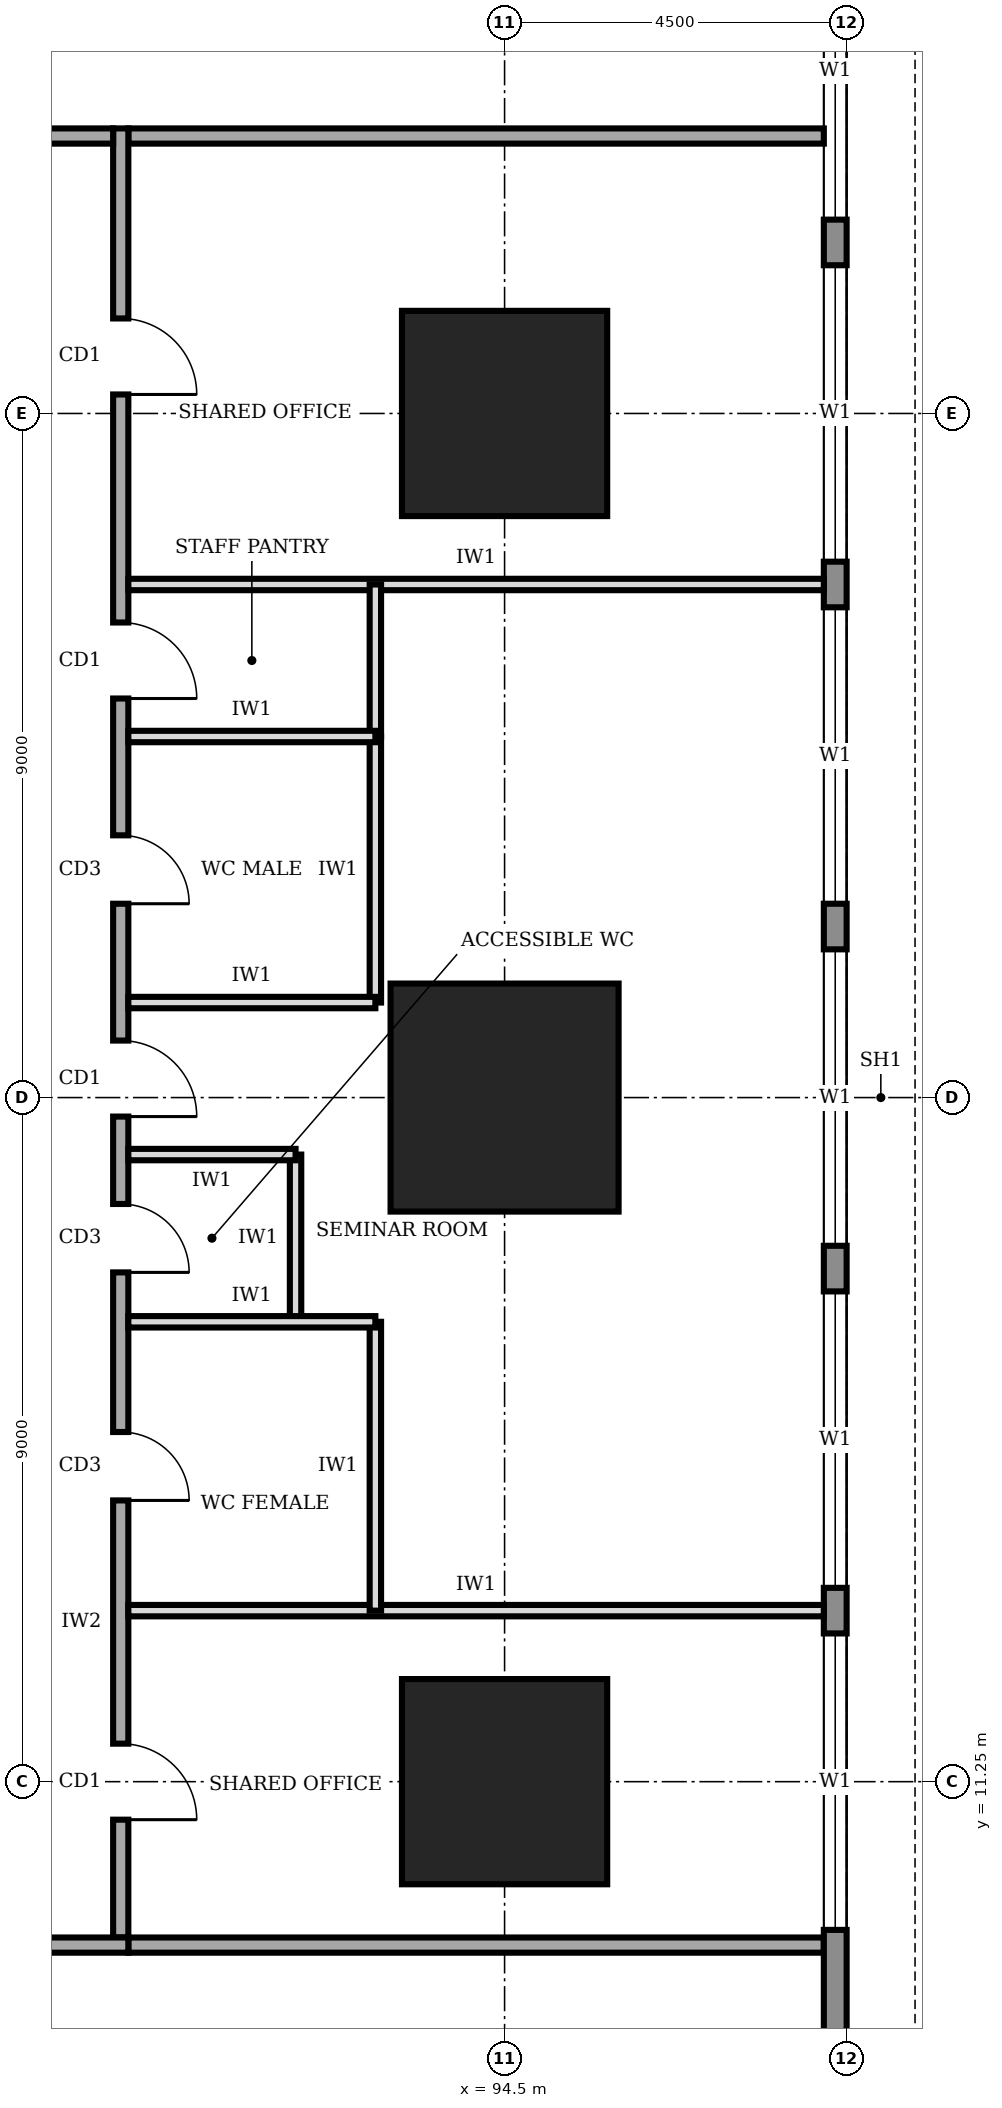
"""IFC4 building model, lengths in metres.
Left out: names, types, materials, properties, quantities, classifications, styles, units other than length and angle.
Written with IfcOpenShell. Run it as: python <this file> out.ifc"""

import sys

from ifc_helpers import new_model, si_unit, direction, frame, frame_2d, origin, origin_2d, place, context, subcontext, project, spatial, rectangle, extrude, element, fill, save


model = new_model("IFC4")
c1 = context("Model", 3, precision=1e-05, world=origin(), true_north=direction((0.0, 1.0)))
c2 = subcontext(c1, "Body", "Model", "MODEL_VIEW")
j1 = project(units=[si_unit("LENGTHUNIT", "METRE"), si_unit("PLANEANGLEUNIT", "RADIAN")], contexts=[c1])
p1 = place(None, origin())
s1 = spatial("IfcSite", under=j1, at=p1, CompositionType="ELEMENT")
p2 = place(p1, origin())
s2 = spatial("IfcBuilding", under=s1, at=p2, CompositionType="ELEMENT")
p3 = place(p2, frame((0.0, 0.0, 29.0)))
s3 = spatial("IfcBuildingStorey", under=s2, at=p3, CompositionType="ELEMENT", Elevation=29.0)
p4 = place(p3, frame((94.5, 11.25, 0.0), z_axis=(0.0, 0.0, 1.0), x_axis=(1.0, 0.0, 0.0)))
e1 = element("IfcColumn", 1, at=p4, inside=s3, PredefinedType="COLUMN", context=c2, shape_type="SweptSolid", body=[
    extrude(rectangle(XDim=2.7, YDim=2.7, at=origin_2d()), origin(), (0.0, 0.0, 1.0), 4.0),
])
p5 = place(p3, frame((94.5, 20.25, 0.0), z_axis=(0.0, 0.0, 1.0), x_axis=(1.0, 0.0, 0.0)))
e2 = element("IfcColumn", 2, at=p5, inside=s3, PredefinedType="COLUMN", context=c2, shape_type="SweptSolid", body=[
    extrude(rectangle(XDim=3.0, YDim=3.0, at=origin_2d()), origin(), (0.0, 0.0, 1.0), 4.0),
])
p6 = place(p3, frame((94.5, 29.25, 0.0), z_axis=(0.0, 0.0, 1.0), x_axis=(1.0, 0.0, 0.0)))
e3 = element("IfcColumn", 3, at=p6, inside=s3, PredefinedType="COLUMN", context=c2, shape_type="SweptSolid", body=[
    extrude(rectangle(XDim=2.7, YDim=2.7, at=origin_2d()), origin(), (0.0, 0.0, 1.0), 4.0),
])
p7 = place(p3, frame((98.85, 4.52, 0.0), z_axis=(0.0, 0.0, 1.0), x_axis=(0.0, 1.0, 0.0)))
e4 = element("IfcWall", 4, at=p7, inside=s3, PredefinedType="STANDARD", context=c2, shape_type="SweptSolid", body=[
    extrude(rectangle(XDim=31.46, YDim=0.3, at=frame_2d((15.73, 0.0))), origin(), (0.0, 0.0, 1.0), 3.75),
])
p8 = place(p7, frame((4.78, 0.0, 0.9)))
e5 = element("IfcOpeningElement", 5, at=p8, cuts=e4, PredefinedType="OPENING", context=c2, shape_type="SweptSolid", body=[
    extrude(rectangle(XDim=3.9, YDim=2.2, at=frame_2d((1.95, 1.1))), frame((0.0, 0.16, 0.0), z_axis=(0.0, -1.0, 0.0), x_axis=(1.0, 0.0, 0.0)), (0.0, 0.0, 1.0), 0.32),
])
p9 = place(p7, frame((9.28, 0.0, 0.9)))
e6 = element("IfcOpeningElement", 6, at=p9, cuts=e4, PredefinedType="OPENING", context=c2, shape_type="SweptSolid", body=[
    extrude(rectangle(XDim=3.9, YDim=2.2, at=frame_2d((1.95, 1.1))), frame((0.0, 0.16, 0.0), z_axis=(0.0, -1.0, 0.0), x_axis=(1.0, 0.0, 0.0)), (0.0, 0.0, 1.0), 0.32),
])
p10 = place(p7, frame((13.78, 0.0, 0.9)))
e7 = element("IfcOpeningElement", 7, at=p10, cuts=e4, PredefinedType="OPENING", context=c2, shape_type="SweptSolid", body=[
    extrude(rectangle(XDim=3.9, YDim=2.2, at=frame_2d((1.95, 1.1))), frame((0.0, 0.16, 0.0), z_axis=(0.0, -1.0, 0.0), x_axis=(1.0, 0.0, 0.0)), (0.0, 0.0, 1.0), 0.32),
])
p11 = place(p7, frame((18.28, 0.0, 0.9)))
e8 = element("IfcOpeningElement", 8, at=p11, cuts=e4, PredefinedType="OPENING", context=c2, shape_type="SweptSolid", body=[
    extrude(rectangle(XDim=3.9, YDim=2.2, at=frame_2d((1.95, 1.1))), frame((0.0, 0.16, 0.0), z_axis=(0.0, -1.0, 0.0), x_axis=(1.0, 0.0, 0.0)), (0.0, 0.0, 1.0), 0.32),
])
p12 = place(p7, frame((22.78, 0.0, 0.9)))
e9 = element("IfcOpeningElement", 9, at=p12, cuts=e4, PredefinedType="OPENING", context=c2, shape_type="SweptSolid", body=[
    extrude(rectangle(XDim=3.9, YDim=2.2, at=frame_2d((1.95, 1.1))), frame((0.0, 0.16, 0.0), z_axis=(0.0, -1.0, 0.0), x_axis=(1.0, 0.0, 0.0)), (0.0, 0.0, 1.0), 0.32),
])
p13 = place(p7, frame((27.28, 0.0, 0.9)))
e10 = element("IfcOpeningElement", 10, at=p13, cuts=e4, PredefinedType="OPENING", context=c2, shape_type="SweptSolid", body=[
    extrude(rectangle(XDim=3.9, YDim=2.2, at=frame_2d((1.95, 1.1))), frame((0.0, 0.16, 0.0), z_axis=(0.0, -1.0, 0.0), x_axis=(1.0, 0.0, 0.0)), (0.0, 0.0, 1.0), 0.32),
])
p14 = place(p3, frame((72.65, 9.1, 0.0), z_axis=(0.0, 0.0, 1.0), x_axis=(1.0, 0.0, 0.0)))
e11 = element("IfcWall", 11, at=p14, inside=s3, PredefinedType="SOLIDWALL", context=c2, shape_type="SweptSolid", body=[
    extrude(rectangle(XDim=16.9, YDim=0.2, at=frame_2d((8.45, 0.0))), origin(), (0.0, 0.0, 1.0), 3.75),
])
p15 = place(p14, frame((0.925, 0.0, 0.0)))
e12 = element("IfcOpeningElement", 12, at=p15, cuts=e11, PredefinedType="OPENING", context=c2, shape_type="SweptSolid", body=[
    extrude(rectangle(XDim=1.8, YDim=2.1, at=frame_2d((0.9, 1.05))), frame((0.0, 0.11, 0.0), z_axis=(0.0, -1.0, 0.0), x_axis=(1.0, 0.0, 0.0)), (0.0, 0.0, 1.0), 0.22),
])
p16 = place(p14, frame((7.85, 0.0, 0.0)))
e13 = element("IfcOpeningElement", 13, at=p16, cuts=e11, PredefinedType="OPENING", context=c2, shape_type="SweptSolid", body=[
    extrude(rectangle(XDim=1.0, YDim=2.1, at=frame_2d((0.5, 1.05))), frame((0.0, 0.11, 0.0), z_axis=(0.0, -1.0, 0.0), x_axis=(1.0, 0.0, 0.0)), (0.0, 0.0, 1.0), 0.22),
])
p17 = place(p14, frame((13.975, 0.0, 0.0)))
e14 = element("IfcOpeningElement", 14, at=p17, cuts=e11, PredefinedType="OPENING", context=c2, shape_type="SweptSolid", body=[
    extrude(rectangle(XDim=1.8, YDim=2.1, at=frame_2d((0.9, 1.05))), frame((0.0, 0.11, 0.0), z_axis=(0.0, -1.0, 0.0), x_axis=(1.0, 0.0, 0.0)), (0.0, 0.0, 1.0), 0.22),
])
p18 = place(p3, frame((89.45, 9.2, 0.0), z_axis=(0.0, 0.0, 1.0), x_axis=(0.0, 1.0, 0.0)))
e15 = element("IfcWall", 15, at=p18, inside=s3, PredefinedType="SOLIDWALL", context=c2, shape_type="SweptSolid", body=[
    extrude(rectangle(XDim=23.8, YDim=0.2, at=frame_2d((11.9, 0.0))), origin(), (0.0, 0.0, 1.0), 3.75),
])
p19 = place(p18, frame((1.55, 0.0, 0.0)))
e16 = element("IfcOpeningElement", 16, at=p19, cuts=e15, PredefinedType="OPENING", context=c2, shape_type="SweptSolid", body=[
    extrude(rectangle(XDim=1.0, YDim=2.1, at=frame_2d((0.5, 1.05))), frame((0.0, 0.11, 0.0), z_axis=(0.0, -1.0, 0.0), x_axis=(1.0, 0.0, 0.0)), (0.0, 0.0, 1.0), 0.22),
])
p20 = place(p18, frame((5.75, 0.0, 0.0)))
e17 = element("IfcOpeningElement", 17, at=p20, cuts=e15, PredefinedType="OPENING", context=c2, shape_type="SweptSolid", body=[
    extrude(rectangle(XDim=0.9, YDim=2.1, at=frame_2d((0.45, 1.05))), frame((0.0, 0.11, 0.0), z_axis=(0.0, -1.0, 0.0), x_axis=(1.0, 0.0, 0.0)), (0.0, 0.0, 1.0), 0.22),
])
p21 = place(p18, frame((8.75, 0.0, 0.0)))
e18 = element("IfcOpeningElement", 18, at=p21, cuts=e15, PredefinedType="OPENING", context=c2, shape_type="SweptSolid", body=[
    extrude(rectangle(XDim=0.9, YDim=2.1, at=frame_2d((0.45, 1.05))), frame((0.0, 0.11, 0.0), z_axis=(0.0, -1.0, 0.0), x_axis=(1.0, 0.0, 0.0)), (0.0, 0.0, 1.0), 0.22),
])
p22 = place(p18, frame((13.6, 0.0, 0.0)))
e19 = element("IfcOpeningElement", 19, at=p22, cuts=e15, PredefinedType="OPENING", context=c2, shape_type="SweptSolid", body=[
    extrude(rectangle(XDim=0.9, YDim=2.1, at=frame_2d((0.45, 1.05))), frame((0.0, 0.11, 0.0), z_axis=(0.0, -1.0, 0.0), x_axis=(1.0, 0.0, 0.0)), (0.0, 0.0, 1.0), 0.22),
])
p23 = place(p18, frame((16.3, 0.0, 0.0)))
e20 = element("IfcOpeningElement", 20, at=p23, cuts=e15, PredefinedType="OPENING", context=c2, shape_type="SweptSolid", body=[
    extrude(rectangle(XDim=1.0, YDim=2.1, at=frame_2d((0.5, 1.05))), frame((0.0, 0.11, 0.0), z_axis=(0.0, -1.0, 0.0), x_axis=(1.0, 0.0, 0.0)), (0.0, 0.0, 1.0), 0.22),
])
p24 = place(p18, frame((10.8, 0.0, 0.0)))
e21 = element("IfcOpeningElement", 21, at=p24, cuts=e15, PredefinedType="OPENING", context=c2, shape_type="SweptSolid", body=[
    extrude(rectangle(XDim=1.0, YDim=2.1, at=frame_2d((0.5, 1.05))), frame((0.0, 0.11, 0.0), z_axis=(0.0, -1.0, 0.0), x_axis=(1.0, 0.0, 0.0)), (0.0, 0.0, 1.0), 0.22),
])
p25 = place(p18, frame((20.3, 0.0, 0.0)))
e22 = element("IfcOpeningElement", 22, at=p25, cuts=e15, PredefinedType="OPENING", context=c2, shape_type="SweptSolid", body=[
    extrude(rectangle(XDim=1.0, YDim=2.1, at=frame_2d((0.5, 1.05))), frame((0.0, 0.11, 0.0), z_axis=(0.0, -1.0, 0.0), x_axis=(1.0, 0.0, 0.0)), (0.0, 0.0, 1.0), 0.22),
])
p26 = place(p3, frame((89.35, 32.9, 0.0), z_axis=(0.0, 0.0, 1.0), x_axis=(-1.0, 0.0, 0.0)))
e23 = element("IfcWall", 23, at=p26, inside=s3, PredefinedType="SOLIDWALL", context=c2, shape_type="SweptSolid", body=[
    extrude(rectangle(XDim=16.9, YDim=0.2, at=frame_2d((8.45, 0.0))), origin(), (0.0, 0.0, 1.0), 3.75),
])
p27 = place(p26, frame((14.375, 0.0, 0.0)))
e24 = element("IfcOpeningElement", 24, at=p27, cuts=e23, PredefinedType="OPENING", context=c2, shape_type="SweptSolid", body=[
    extrude(rectangle(XDim=1.0, YDim=2.1, at=frame_2d((0.5, 1.05))), frame((0.0, 0.11, 0.0), z_axis=(0.0, -1.0, 0.0), x_axis=(1.0, 0.0, 0.0)), (0.0, 0.0, 1.0), 0.22),
])
p28 = place(p26, frame((7.85, 0.0, 0.0)))
e25 = element("IfcOpeningElement", 25, at=p28, cuts=e23, PredefinedType="OPENING", context=c2, shape_type="SweptSolid", body=[
    extrude(rectangle(XDim=1.0, YDim=2.1, at=frame_2d((0.5, 1.05))), frame((0.0, 0.11, 0.0), z_axis=(0.0, -1.0, 0.0), x_axis=(1.0, 0.0, 0.0)), (0.0, 0.0, 1.0), 0.22),
])
p29 = place(p26, frame((1.325, 0.0, 0.0)))
e26 = element("IfcOpeningElement", 26, at=p29, cuts=e23, PredefinedType="OPENING", context=c2, shape_type="SweptSolid", body=[
    extrude(rectangle(XDim=1.0, YDim=2.1, at=frame_2d((0.5, 1.05))), frame((0.0, 0.11, 0.0), z_axis=(0.0, -1.0, 0.0), x_axis=(1.0, 0.0, 0.0)), (0.0, 0.0, 1.0), 0.22),
])
for number, where, z_axis, x_axis in (
    (27, (89.55, 9.1, 0.0), (0.0, 0.0, 1.0), (1.0, 0.0, 0.0)),
    (28, (89.55, 32.9, 0.0), (0.0, 0.0, 1.0), (1.0, 0.0, 0.0)),
):
    element("IfcWall", number, at=place(p3, frame(where, z_axis=z_axis, x_axis=x_axis)), inside=s3, PredefinedType="SOLIDWALL", context=c2, shape_type="SweptSolid", body=[
        extrude(rectangle(XDim=9.15, YDim=0.2, at=frame_2d((4.575, 0.0))), origin(), (0.0, 0.0, 1.0), 3.75),
    ])
for number, where, z_axis, x_axis in (
    (29, (89.55, 13.5, 0.0), (0.0, 0.0, 1.0), (1.0, 0.0, 0.0)),
    (30, (89.55, 27.0, 0.0), (0.0, 0.0, 1.0), (1.0, 0.0, 0.0)),
):
    element("IfcWall", number, at=place(p3, frame(where, z_axis=z_axis, x_axis=x_axis)), inside=s3, PredefinedType="PARTITIONING", context=c2, shape_type="SweptSolid", body=[
        extrude(rectangle(XDim=9.15, YDim=0.15, at=frame_2d((4.575, 0.0))), origin(), (0.0, 0.0, 1.0), 3.75),
    ])
p30 = place(p3, frame((89.55, 17.3, 0.0), z_axis=(0.0, 0.0, 1.0), x_axis=(1.0, 0.0, 0.0)))
e31 = element("IfcWall", 31, at=p30, inside=s3, PredefinedType="PARTITIONING", context=c2, shape_type="SweptSolid", body=[
    extrude(rectangle(XDim=3.25, YDim=0.15, at=frame_2d((1.625, 0.0))), origin(), (0.0, 0.0, 1.0), 3.75),
])
p31 = place(p3, frame((89.55, 19.5, 0.0), z_axis=(0.0, 0.0, 1.0), x_axis=(1.0, 0.0, 0.0)))
e32 = element("IfcWall", 32, at=p31, inside=s3, PredefinedType="PARTITIONING", context=c2, shape_type="SweptSolid", body=[
    extrude(rectangle(XDim=2.2, YDim=0.15, at=frame_2d((1.1, 0.0))), origin(), (0.0, 0.0, 1.0), 2.85),
])
for number, where, z_axis, x_axis in (
    (33, (89.55, 21.5, 0.0), (0.0, 0.0, 1.0), (1.0, 0.0, 0.0)),
    (34, (89.55, 25.0, 0.0), (0.0, 0.0, 1.0), (1.0, 0.0, 0.0)),
):
    element("IfcWall", number, at=place(p3, frame(where, z_axis=z_axis, x_axis=x_axis)), inside=s3, PredefinedType="PARTITIONING", context=c2, shape_type="SweptSolid", body=[
        extrude(rectangle(XDim=3.25, YDim=0.15, at=frame_2d((1.625, 0.0))), origin(), (0.0, 0.0, 1.0), 3.75),
    ])
p32 = place(p3, frame((92.8, 13.5, 0.0), z_axis=(0.0, 0.0, 1.0), x_axis=(0.0, 1.0, 0.0)))
e35 = element("IfcWall", 35, at=p32, inside=s3, PredefinedType="PARTITIONING", context=c2, shape_type="SweptSolid", body=[
    extrude(rectangle(XDim=3.8, YDim=0.15, at=frame_2d((1.9, 0.0))), origin(), (0.0, 0.0, 1.0), 3.75),
])
p33 = place(p3, frame((91.75, 17.3, 0.0), z_axis=(0.0, 0.0, 1.0), x_axis=(0.0, 1.0, 0.0)))
e36 = element("IfcWall", 36, at=p33, inside=s3, PredefinedType="PARTITIONING", context=c2, shape_type="SweptSolid", body=[
    extrude(rectangle(XDim=2.2, YDim=0.15, at=frame_2d((1.1, 0.0))), origin(), (0.0, 0.0, 1.0), 3.75),
])
p34 = place(p3, frame((92.8, 21.5, 0.0), z_axis=(0.0, 0.0, 1.0), x_axis=(0.0, 1.0, 0.0)))
e37 = element("IfcWall", 37, at=p34, inside=s3, PredefinedType="PARTITIONING", context=c2, shape_type="SweptSolid", body=[
    extrude(rectangle(XDim=3.5, YDim=0.15, at=frame_2d((1.75, 0.0))), origin(), (0.0, 0.0, 1.0), 3.75),
])
p35 = place(p3, frame((92.8, 25.0, 0.0), z_axis=(0.0, 0.0, 1.0), x_axis=(0.0, 1.0, 0.0)))
e38 = element("IfcWall", 38, at=p35, inside=s3, PredefinedType="PARTITIONING", context=c2, shape_type="SweptSolid", body=[
    extrude(rectangle(XDim=2.0, YDim=0.15, at=frame_2d((1.0, 0.0))), origin(), (0.0, 0.0, 1.0), 3.75),
])
p36 = place(p8, origin())
e39 = element("IfcWindow", 39, at=p36, inside=s3, PartitioningType="SINGLE_PANEL", PredefinedType="WINDOW", context=c2, shape_type="SweptSolid", body=[
    extrude(rectangle(XDim=3.9, YDim=2.2, at=frame_2d((1.95, 1.1))), frame((0.0, 0.03, 0.0), z_axis=(0.0, -1.0, 0.0), x_axis=(1.0, 0.0, 0.0)), (0.0, 0.0, 1.0), 0.06),
])
fill(e5, e39)
p37 = place(p9, origin())
e40 = element("IfcWindow", 40, at=p37, inside=s3, PartitioningType="SINGLE_PANEL", PredefinedType="WINDOW", context=c2, shape_type="SweptSolid", body=[
    extrude(rectangle(XDim=3.9, YDim=2.2, at=frame_2d((1.95, 1.1))), frame((0.0, 0.03, 0.0), z_axis=(0.0, -1.0, 0.0), x_axis=(1.0, 0.0, 0.0)), (0.0, 0.0, 1.0), 0.06),
])
fill(e6, e40)
p38 = place(p10, origin())
e41 = element("IfcWindow", 41, at=p38, inside=s3, PartitioningType="SINGLE_PANEL", PredefinedType="WINDOW", context=c2, shape_type="SweptSolid", body=[
    extrude(rectangle(XDim=3.9, YDim=2.2, at=frame_2d((1.95, 1.1))), frame((0.0, 0.03, 0.0), z_axis=(0.0, -1.0, 0.0), x_axis=(1.0, 0.0, 0.0)), (0.0, 0.0, 1.0), 0.06),
])
fill(e7, e41)
p39 = place(p11, origin())
e42 = element("IfcWindow", 42, at=p39, inside=s3, PartitioningType="SINGLE_PANEL", PredefinedType="WINDOW", context=c2, shape_type="SweptSolid", body=[
    extrude(rectangle(XDim=3.9, YDim=2.2, at=frame_2d((1.95, 1.1))), frame((0.0, 0.03, 0.0), z_axis=(0.0, -1.0, 0.0), x_axis=(1.0, 0.0, 0.0)), (0.0, 0.0, 1.0), 0.06),
])
fill(e8, e42)
p40 = place(p12, origin())
e43 = element("IfcWindow", 43, at=p40, inside=s3, PartitioningType="SINGLE_PANEL", PredefinedType="WINDOW", context=c2, shape_type="SweptSolid", body=[
    extrude(rectangle(XDim=3.9, YDim=2.2, at=frame_2d((1.95, 1.1))), frame((0.0, 0.03, 0.0), z_axis=(0.0, -1.0, 0.0), x_axis=(1.0, 0.0, 0.0)), (0.0, 0.0, 1.0), 0.06),
])
fill(e9, e43)
p41 = place(p13, origin())
e44 = element("IfcWindow", 44, at=p41, inside=s3, PartitioningType="SINGLE_PANEL", PredefinedType="WINDOW", context=c2, shape_type="SweptSolid", body=[
    extrude(rectangle(XDim=3.9, YDim=2.2, at=frame_2d((1.95, 1.1))), frame((0.0, 0.03, 0.0), z_axis=(0.0, -1.0, 0.0), x_axis=(1.0, 0.0, 0.0)), (0.0, 0.0, 1.0), 0.06),
])
fill(e10, e44)
p42 = place(p19, frame((1.0, 0.0, 0.0), z_axis=(0.0, 0.0, 1.0), x_axis=(-1.0, 0.0, 0.0)))
e45 = element("IfcDoor", 45, at=p42, inside=s3, OperationType="SINGLE_SWING_RIGHT", PredefinedType="DOOR", context=c2, shape_type="SweptSolid", body=[
    extrude(rectangle(XDim=1.0, YDim=2.1, at=frame_2d((0.5, 1.05))), frame((0.0, 0.025, 0.0), z_axis=(0.0, -1.0, 0.0), x_axis=(1.0, 0.0, 0.0)), (0.0, 0.0, 1.0), 0.05),
])
fill(e16, e45)
p43 = place(p20, frame((0.9, 0.0, 0.0), z_axis=(0.0, 0.0, 1.0), x_axis=(-1.0, 0.0, 0.0)))
e46 = element("IfcDoor", 46, at=p43, inside=s3, OperationType="SINGLE_SWING_RIGHT", PredefinedType="DOOR", context=c2, shape_type="SweptSolid", body=[
    extrude(rectangle(XDim=0.9, YDim=2.1, at=frame_2d((0.45, 1.05))), frame((0.0, 0.025, 0.0), z_axis=(0.0, -1.0, 0.0), x_axis=(1.0, 0.0, 0.0)), (0.0, 0.0, 1.0), 0.05),
])
fill(e17, e46)
p44 = place(p21, frame((0.9, 0.0, 0.0), z_axis=(0.0, 0.0, 1.0), x_axis=(-1.0, 0.0, 0.0)))
e47 = element("IfcDoor", 47, at=p44, inside=s3, OperationType="SINGLE_SWING_RIGHT", PredefinedType="DOOR", context=c2, shape_type="SweptSolid", body=[
    extrude(rectangle(XDim=0.9, YDim=2.1, at=frame_2d((0.45, 1.05))), frame((0.0, 0.025, 0.0), z_axis=(0.0, -1.0, 0.0), x_axis=(1.0, 0.0, 0.0)), (0.0, 0.0, 1.0), 0.05),
])
fill(e18, e47)
p45 = place(p22, frame((0.9, 0.0, 0.0), z_axis=(0.0, 0.0, 1.0), x_axis=(-1.0, 0.0, 0.0)))
e48 = element("IfcDoor", 48, at=p45, inside=s3, OperationType="SINGLE_SWING_RIGHT", PredefinedType="DOOR", context=c2, shape_type="SweptSolid", body=[
    extrude(rectangle(XDim=0.9, YDim=2.1, at=frame_2d((0.45, 1.05))), frame((0.0, 0.025, 0.0), z_axis=(0.0, -1.0, 0.0), x_axis=(1.0, 0.0, 0.0)), (0.0, 0.0, 1.0), 0.05),
])
fill(e19, e48)
p46 = place(p23, frame((1.0, 0.0, 0.0), z_axis=(0.0, 0.0, 1.0), x_axis=(-1.0, 0.0, 0.0)))
e49 = element("IfcDoor", 49, at=p46, inside=s3, OperationType="SINGLE_SWING_RIGHT", PredefinedType="DOOR", context=c2, shape_type="SweptSolid", body=[
    extrude(rectangle(XDim=1.0, YDim=2.1, at=frame_2d((0.5, 1.05))), frame((0.0, 0.025, 0.0), z_axis=(0.0, -1.0, 0.0), x_axis=(1.0, 0.0, 0.0)), (0.0, 0.0, 1.0), 0.05),
])
fill(e20, e49)
p47 = place(p24, frame((1.0, 0.0, 0.0), z_axis=(0.0, 0.0, 1.0), x_axis=(-1.0, 0.0, 0.0)))
e50 = element("IfcDoor", 50, at=p47, inside=s3, OperationType="SINGLE_SWING_RIGHT", PredefinedType="DOOR", context=c2, shape_type="SweptSolid", body=[
    extrude(rectangle(XDim=1.0, YDim=2.1, at=frame_2d((0.5, 1.05))), frame((0.0, 0.025, 0.0), z_axis=(0.0, -1.0, 0.0), x_axis=(1.0, 0.0, 0.0)), (0.0, 0.0, 1.0), 0.05),
])
fill(e21, e50)
p48 = place(p25, frame((1.0, 0.0, 0.0), z_axis=(0.0, 0.0, 1.0), x_axis=(-1.0, 0.0, 0.0)))
e51 = element("IfcDoor", 51, at=p48, inside=s3, OperationType="SINGLE_SWING_RIGHT", PredefinedType="DOOR", context=c2, shape_type="SweptSolid", body=[
    extrude(rectangle(XDim=1.0, YDim=2.1, at=frame_2d((0.5, 1.05))), frame((0.0, 0.025, 0.0), z_axis=(0.0, -1.0, 0.0), x_axis=(1.0, 0.0, 0.0)), (0.0, 0.0, 1.0), 0.05),
])
fill(e22, e51)
save(model, sys.argv[1])
